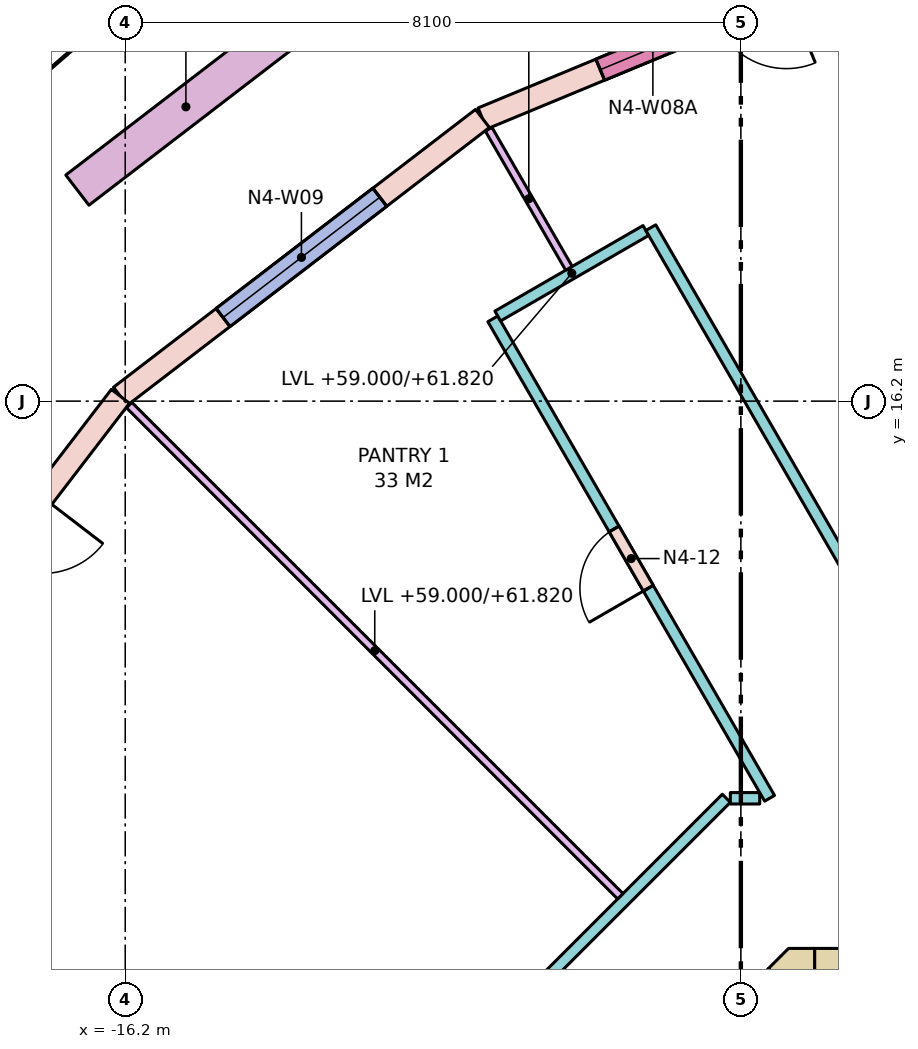
"""IFC4 building model, lengths in metres.
Left out: names, types, materials, properties, quantities, classifications, styles, units other than length and angle.
Written with IfcOpenShell. Run it as: python <this file> out.ifc"""

import sys

from ifc_helpers import new_model, si_unit, direction, frame, frame_2d, origin, place, context, subcontext, project, spatial, polyline, rectangle, outline, extrude, element, fill, save


model = new_model("IFC4")
c1 = context("Model", 3, precision=1e-05, world=origin(), true_north=direction((0.0, 1.0)))
c2 = subcontext(c1, "Body", "Model", "MODEL_VIEW")
j1 = project(units=[si_unit("LENGTHUNIT", "METRE"), si_unit("PLANEANGLEUNIT", "RADIAN")], contexts=[c1])
p1 = place(None, origin())
s1 = spatial("IfcSite", under=j1, at=p1, CompositionType="ELEMENT")
p2 = place(p1, origin())
s2 = spatial("IfcBuilding", under=s1, at=p2, CompositionType="ELEMENT")
p3 = place(p2, frame((0.0, 0.0, 59.0)))
s3 = spatial("IfcBuildingStorey", under=s2, at=p3, CompositionType="ELEMENT", Elevation=59.0)
p4 = place(p3, frame((-7.13, 8.55, -0.28), z_axis=(0.0, 0.0, 1.0), x_axis=(1.0, 0.0, 0.0)))
e1 = element("IfcWall", 1, at=p4, inside=s3, PredefinedType="SHEAR", context=c2, shape_type="SweptSolid", body=[
    extrude(rectangle(XDim=14.26, YDim=0.9, at=frame_2d((7.13, 0.0))), origin(), (0.0, 0.0, 1.0), 4.0),
])
p5 = place(p4, frame((5.48, 0.0, 0.28)))
e2 = element("IfcOpeningElement", 2, at=p5, cuts=e1, PredefinedType="OPENING", context=c2, shape_type="SweptSolid", body=[
    extrude(rectangle(XDim=0.7, YDim=2.1, at=frame_2d((0.35, 1.05))), frame((0.0, 0.46, 0.0), z_axis=(0.0, -1.0, 0.0), x_axis=(1.0, 0.0, 0.0)), (0.0, 0.0, 1.0), 0.92),
])
p6 = place(p4, frame((7.155, 0.0, 0.28)))
e3 = element("IfcOpeningElement", 3, at=p6, cuts=e1, PredefinedType="OPENING", context=c2, shape_type="SweptSolid", body=[
    extrude(rectangle(XDim=0.9, YDim=2.1, at=frame_2d((0.45, 1.05))), frame((0.0, 0.46, 0.0), z_axis=(0.0, -1.0, 0.0), x_axis=(1.0, 0.0, 0.0)), (0.0, 0.0, 1.0), 0.92),
])
p7 = place(p3, frame((-10.418, 5.418, -0.28), z_axis=(0.0, 0.0, 1.0), x_axis=(0.707106781187, 0.707106781187, 0.0)))
e4 = element("IfcWall", 4, at=p7, inside=s3, PredefinedType="SHEAR", context=c2, shape_type="SweptSolid", body=[
    extrude(rectangle(XDim=4.243, YDim=0.9, at=frame_2d((2.121, 0.0))), origin(), (0.0, 0.0, 1.0), 4.0),
])
p8 = place(p7, frame((0.65, 0.0, 0.28)))
e5 = element("IfcOpeningElement", 5, at=p8, cuts=e4, PredefinedType="OPENING", context=c2, shape_type="SweptSolid", body=[
    extrude(rectangle(XDim=1.2, YDim=2.1, at=frame_2d((0.6, 1.05))), frame((0.0, 0.46, 0.0), z_axis=(0.0, -1.0, 0.0), x_axis=(1.0, 0.0, 0.0)), (0.0, 0.0, 1.0), 0.92),
])
p9 = place(p3, frame((0.0, 0.0, -0.28)))
e6 = element("IfcWall", 6, at=p9, inside=s3, PredefinedType="SHEAR", context=c2, shape_type="SweptSolid", body=[
    extrude(outline(polyline([(-7.473, 9.0), (-7.13, 9.0), (-7.13, 8.13), (-7.736, 8.736), (-7.473, 9.0)])), origin(), (0.0, 0.0, 1.0), 4.0),
])
p10 = place(p3, frame((-5.953, 22.216, 0.0), z_axis=(0.0, 0.0, 1.0), x_axis=(-0.923884511653, -0.382671411433, 0.0)))
e7 = element("IfcWall", 7, at=p10, inside=s3, PredefinedType="STANDARD", context=c2, shape_type="SweptSolid", body=[
    extrude(rectangle(XDim=6.004, YDim=0.3, at=frame_2d((3.002, 0.0))), origin(), (0.0, 0.0, 1.0), 3.72),
])
p11 = place(p10, frame((1.677, 0.0, 0.0)))
e8 = element("IfcOpeningElement", 8, at=p11, cuts=e7, PredefinedType="OPENING", context=c2, shape_type="SweptSolid", body=[
    extrude(rectangle(XDim=1.0, YDim=2.4, at=frame_2d((0.5, 1.2))), frame((0.0, 0.16, 0.0), z_axis=(0.0, -1.0, 0.0), x_axis=(1.0, 0.0, 0.0)), (0.0, 0.0, 1.0), 0.32),
])
p12 = place(p10, frame((2.827, 0.0, 0.8)))
e9 = element("IfcOpeningElement", 9, at=p12, cuts=e7, PredefinedType="OPENING", context=c2, shape_type="SweptSolid", body=[
    extrude(rectangle(XDim=1.5, YDim=2.7, at=frame_2d((0.75, 1.35))), frame((0.0, 0.16, 0.0), z_axis=(0.0, -1.0, 0.0), x_axis=(1.0, 0.0, 0.0)), (0.0, 0.0, 1.0), 0.32),
])
p13 = place(p3, frame((-11.5, 19.919, 0.0), z_axis=(0.0, 0.0, 1.0), x_axis=(-0.793339924758, -0.608778912074, 0.0)))
e10 = element("IfcWall", 10, at=p13, inside=s3, PredefinedType="STANDARD", context=c2, shape_type="SweptSolid", body=[
    extrude(rectangle(XDim=6.004, YDim=0.3, at=frame_2d((3.002, 0.0))), origin(), (0.0, 0.0, 1.0), 3.72),
])
p14 = place(p13, frame((1.702, 0.0, 0.8)))
e11 = element("IfcOpeningElement", 11, at=p14, cuts=e10, PredefinedType="OPENING", context=c2, shape_type="SweptSolid", body=[
    extrude(rectangle(XDim=2.6, YDim=2.7, at=frame_2d((1.3, 1.35))), frame((0.0, 0.16, 0.0), z_axis=(0.0, -1.0, 0.0), x_axis=(1.0, 0.0, 0.0)), (0.0, 0.0, 1.0), 0.32),
])
p15 = place(p3, frame((-16.263, 16.263, 0.0), z_axis=(0.0, 0.0, 1.0), x_axis=(-0.608778912074, -0.793339924758, 0.0)))
e12 = element("IfcWall", 12, at=p15, inside=s3, PredefinedType="STANDARD", context=c2, shape_type="SweptSolid", body=[
    extrude(rectangle(XDim=6.004, YDim=0.3, at=frame_2d((3.002, 0.0))), origin(), (0.0, 0.0, 1.0), 3.72),
])
p16 = place(p15, frame((1.677, 0.0, 0.0)))
e13 = element("IfcOpeningElement", 13, at=p16, cuts=e12, PredefinedType="OPENING", context=c2, shape_type="SweptSolid", body=[
    extrude(rectangle(XDim=1.0, YDim=2.4, at=frame_2d((0.5, 1.2))), frame((0.0, 0.16, 0.0), z_axis=(0.0, -1.0, 0.0), x_axis=(1.0, 0.0, 0.0)), (0.0, 0.0, 1.0), 0.32),
])
p17 = place(p15, frame((2.827, 0.0, 0.8)))
e14 = element("IfcOpeningElement", 14, at=p17, cuts=e12, PredefinedType="OPENING", context=c2, shape_type="SweptSolid", body=[
    extrude(rectangle(XDim=1.5, YDim=2.7, at=frame_2d((0.75, 1.35))), frame((0.0, 0.16, 0.0), z_axis=(0.0, -1.0, 0.0), x_axis=(1.0, 0.0, 0.0)), (0.0, 0.0, 1.0), 0.32),
])
p18 = place(p3, frame((-13.974, 21.167, 0.0), z_axis=(0.0, 0.0, 1.0), x_axis=(-0.793359599829, -0.608753271334, 0.0)))
e15 = element("IfcWall", 15, at=p18, inside=s3, PredefinedType="PARAPET", context=c2, shape_type="SweptSolid", body=[
    extrude(rectangle(XDim=3.6, YDim=0.5, at=frame_2d((1.8, 0.0))), origin(), (0.0, 0.0, 1.0), 0.9),
])
p19 = place(p3, frame((-12.938, 6.328, 0.0), z_axis=(0.0, 0.0, 1.0), x_axis=(0.707088206597, 0.707125355289, 0.0)))
e16 = element("IfcWall", 16, at=p19, inside=s3, PredefinedType="PARTITIONING", context=c2, shape_type="SweptSolid", body=[
    extrude(rectangle(XDim=6.572, YDim=0.15, at=frame_2d((3.286, 0.0))), origin(), (0.0, 0.0, 1.0), 2.82),
])
p20 = place(p3, frame((-8.238, 10.975, 0.0), z_axis=(0.0, 0.0, 1.0), x_axis=(1.0, 0.0, 0.0)))
e17 = element("IfcWall", 17, at=p20, inside=s3, PredefinedType="PARTITIONING", context=c2, shape_type="SweptSolid", body=[
    extrude(rectangle(XDim=0.386, YDim=0.15, at=frame_2d((0.193, 0.0))), origin(), (0.0, 0.0, 1.0), 3.72),
])
p21 = place(p3, frame((-7.722, 10.975, 0.0), z_axis=(0.0, 0.0, 1.0), x_axis=(-0.499993290699, 0.866029277366, 0.0)))
e18 = element("IfcWall", 18, at=p21, inside=s3, PredefinedType="PARTITIONING", context=c2, shape_type="SweptSolid", body=[
    extrude(rectangle(XDim=7.283, YDim=0.15, at=frame_2d((3.641, 0.0))), origin(), (0.0, 0.0, 1.0), 3.72),
])
p22 = place(p21, frame((3.191, 0.0, 0.0)))
e19 = element("IfcOpeningElement", 19, at=p22, cuts=e18, PredefinedType="OPENING", context=c2, shape_type="SweptSolid", body=[
    extrude(rectangle(XDim=0.9, YDim=2.1, at=frame_2d((0.45, 1.05))), frame((0.0, 0.085, 0.0), z_axis=(0.0, -1.0, 0.0), x_axis=(1.0, 0.0, 0.0)), (0.0, 0.0, 1.0), 0.17),
])
p23 = place(p3, frame((-11.299, 17.32, 0.0), z_axis=(0.0, 0.0, 1.0), x_axis=(0.866017533419, 0.500013631625, 0.0)))
e20 = element("IfcWall", 20, at=p23, inside=s3, PredefinedType="PARTITIONING", context=c2, shape_type="SweptSolid", body=[
    extrude(rectangle(XDim=2.25, YDim=0.15, at=frame_2d((1.125, 0.0))), origin(), (0.0, 0.0, 1.0), 2.82),
])
p24 = place(p3, frame((-9.285, 18.482, 0.0), z_axis=(0.0, 0.0, 1.0), x_axis=(0.49998445949, -0.866034375916, 0.0)))
e21 = element("IfcWall", 21, at=p24, inside=s3, PredefinedType="PARTITIONING", context=c2, shape_type="SweptSolid", body=[
    extrude(rectangle(XDim=8.604, YDim=0.15, at=frame_2d((4.302, 0.0))), origin(), (0.0, 0.0, 1.0), 3.72),
])
p25 = place(p3, frame((-10.362, 17.947, 0.0), z_axis=(0.0, 0.0, 1.0), x_axis=(-0.500065834316, 0.865987390988, 0.0)))
e22 = element("IfcWall", 22, at=p25, inside=s3, PredefinedType="PARTITIONING", context=c2, shape_type="SweptSolid", body=[
    extrude(rectangle(XDim=2.113, YDim=0.1, at=frame_2d((1.057, 0.0))), origin(), (0.0, 0.0, 1.0), 2.82),
])
p26 = place(p3, frame((-9.686, 9.686, 0.0), z_axis=(0.0, 0.0, 1.0), x_axis=(-0.707106781187, 0.707106781187, 0.0)))
e23 = element("IfcWall", 23, at=p26, inside=s3, PredefinedType="PARTITIONING", context=c2, shape_type="SweptSolid", body=[
    extrude(rectangle(XDim=9.138, YDim=0.1, at=frame_2d((4.569, 0.0))), origin(), (0.0, 0.0, 1.0), 2.82),
])
p27 = place(p12, origin())
e24 = element("IfcWindow", 24, at=p27, inside=s3, PartitioningType="SINGLE_PANEL", PredefinedType="WINDOW", context=c2, shape_type="SweptSolid", body=[
    extrude(rectangle(XDim=1.5, YDim=2.7, at=frame_2d((0.75, 1.35))), frame((0.0, 0.03, 0.0), z_axis=(0.0, -1.0, 0.0), x_axis=(1.0, 0.0, 0.0)), (0.0, 0.0, 1.0), 0.06),
])
fill(e9, e24)
p28 = place(p14, origin())
e25 = element("IfcWindow", 25, at=p28, inside=s3, PartitioningType="SINGLE_PANEL", PredefinedType="WINDOW", context=c2, shape_type="SweptSolid", body=[
    extrude(rectangle(XDim=2.6, YDim=2.7, at=frame_2d((1.3, 1.35))), frame((0.0, 0.03, 0.0), z_axis=(0.0, -1.0, 0.0), x_axis=(1.0, 0.0, 0.0)), (0.0, 0.0, 1.0), 0.06),
])
fill(e11, e25)
p29 = place(p22, origin())
e26 = element("IfcDoor", 26, at=p29, inside=s3, OperationType="SINGLE_SWING_LEFT", PredefinedType="DOOR", context=c2, shape_type="SweptSolid", body=[
    extrude(rectangle(XDim=0.9, YDim=2.1, at=frame_2d((0.45, 1.05))), frame((0.0, 0.025, 0.0), z_axis=(0.0, -1.0, 0.0), x_axis=(1.0, 0.0, 0.0)), (0.0, 0.0, 1.0), 0.05),
])
fill(e19, e26)
save(model, sys.argv[1])
